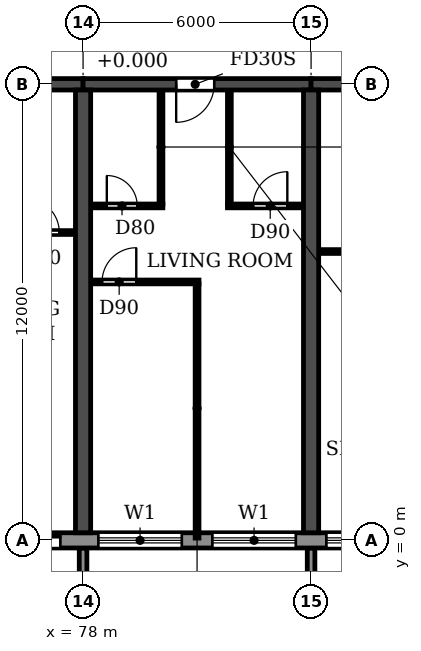
"""IFC4 building model, lengths in metres.
Left out: names, types, materials, properties, quantities, classifications, styles, units other than length and angle.
Written with IfcOpenShell. Run it as: python <this file> out.ifc"""

import sys

from ifc_helpers import new_model, si_unit, direction, frame, frame_2d, origin, place, context, subcontext, project, spatial, polyline, rectangle, outline, extrude, source, transform, mapped, element, fill, save


model = new_model("IFC4")
c1 = context("Model", 3, precision=1e-05, world=origin(), true_north=direction((0.0, 1.0)))
c2 = subcontext(c1, "Body", "Model", "MODEL_VIEW")
j1 = project(units=[si_unit("LENGTHUNIT", "METRE"), si_unit("PLANEANGLEUNIT", "RADIAN")], contexts=[c1])
p1 = place(None, origin())
s1 = spatial("IfcSite", under=j1, at=p1, CompositionType="ELEMENT")
p2 = place(p1, origin())
s2 = spatial("IfcBuilding", under=s1, at=p2, CompositionType="ELEMENT")
p3 = place(p2, frame((0.0, 0.0, 49.8)))
s3 = spatial("IfcBuildingStorey", under=s2, at=p3, CompositionType="ELEMENT", Elevation=49.8)
for number, where, z_axis, x_axis in (
    (1, (78.0, 0.2, 0.0), (0.0, 0.0, 1.0), (0.0, 1.0, 0.0)),
    (2, (84.0, 0.2, 0.0), (0.0, 0.0, 1.0), (0.0, 1.0, 0.0)),
):
    element("IfcWall", number, at=place(p3, frame(where, z_axis=z_axis, x_axis=x_axis)), inside=s3, PredefinedType="SHEAR", context=c2, shape_type="SweptSolid", body=[
        extrude(rectangle(XDim=11.65, YDim=0.4, at=frame_2d((5.825, 0.0))), origin(), (0.0, 0.0, 1.0), 3.0),
    ])
p4 = place(p3, frame((72.0, 12.0, 0.0), z_axis=(0.0, 0.0, 1.0), x_axis=(1.0, 0.0, 0.0)))
e3 = element("IfcWall", 3, at=p4, inside=s3, PredefinedType="SHEAR", context=c2, shape_type="SweptSolid", body=[
    extrude(rectangle(XDim=6.0, YDim=0.3, at=frame_2d((3.0, 0.0))), origin(), (0.0, 0.0, 1.0), 2.4),
])
p5 = place(p4, frame((2.45, 0.0, 0.0)))
e4 = element("IfcOpeningElement", 4, at=p5, cuts=e3, PredefinedType="OPENING", context=c2, shape_type="SweptSolid", body=[
    extrude(rectangle(XDim=1.0, YDim=2.1, at=frame_2d((0.5, 1.05))), frame((0.0, 0.16, 0.0), z_axis=(0.0, -1.0, 0.0), x_axis=(1.0, 0.0, 0.0)), (0.0, 0.0, 1.0), 0.32),
])
p6 = place(p3, frame((78.0, 12.0, 0.0), z_axis=(0.0, 0.0, 1.0), x_axis=(1.0, 0.0, 0.0)))
e5 = element("IfcWall", 5, at=p6, inside=s3, PredefinedType="SHEAR", context=c2, shape_type="SweptSolid", body=[
    extrude(rectangle(XDim=6.0, YDim=0.3, at=frame_2d((3.0, 0.0))), origin(), (0.0, 0.0, 1.0), 2.4),
])
p7 = place(p6, frame((2.45, 0.0, 0.0)))
e6 = element("IfcOpeningElement", 6, at=p7, cuts=e5, PredefinedType="OPENING", context=c2, shape_type="SweptSolid", body=[
    extrude(rectangle(XDim=1.0, YDim=2.1, at=frame_2d((0.5, 1.05))), frame((0.0, 0.16, 0.0), z_axis=(0.0, -1.0, 0.0), x_axis=(1.0, 0.0, 0.0)), (0.0, 0.0, 1.0), 0.32),
])
p8 = place(p3, frame((84.0, 12.0, 0.0), z_axis=(0.0, 0.0, 1.0), x_axis=(1.0, 0.0, 0.0)))
e7 = element("IfcWall", 7, at=p8, inside=s3, PredefinedType="SHEAR", context=c2, shape_type="SweptSolid", body=[
    extrude(rectangle(XDim=6.0, YDim=0.3, at=frame_2d((3.0, 0.0))), origin(), (0.0, 0.0, 1.0), 2.4),
])
p9 = place(p8, frame((2.45, 0.0, 0.0)))
e8 = element("IfcOpeningElement", 8, at=p9, cuts=e7, PredefinedType="OPENING", context=c2, shape_type="SweptSolid", body=[
    extrude(rectangle(XDim=1.0, YDim=2.1, at=frame_2d((0.5, 1.05))), frame((0.0, 0.16, 0.0), z_axis=(0.0, -1.0, 0.0), x_axis=(1.0, 0.0, 0.0)), (0.0, 0.0, 1.0), 0.32),
])
p10 = place(p3, frame((4.683, 0.0, 0.0), z_axis=(0.0, 0.0, 1.0), x_axis=(1.0, 0.0, 0.0)))
e9 = element("IfcWall", 9, at=p10, inside=s3, PredefinedType="STANDARD", context=c2, shape_type="SweptSolid", body=[
    extrude(rectangle(XDim=92.634, YDim=0.4, at=frame_2d((46.317, 0.0))), origin(), (0.0, 0.0, 1.0), 3.0),
])
p11 = place(p10, frame((1.717, 0.0, 0.9)))
e10 = element("IfcOpeningElement", 10, at=p11, cuts=e9, PredefinedType="OPENING", context=c2, shape_type="SweptSolid", body=[
    extrude(rectangle(XDim=2.2, YDim=1.5, at=frame_2d((1.1, 0.75))), frame((0.0, 0.21, 0.0), z_axis=(0.0, -1.0, 0.0), x_axis=(1.0, 0.0, 0.0)), (0.0, 0.0, 1.0), 0.42),
])
p12 = place(p10, frame((4.717, 0.0, 0.9)))
e11 = element("IfcOpeningElement", 11, at=p12, cuts=e9, PredefinedType="OPENING", context=c2, shape_type="SweptSolid", body=[
    extrude(rectangle(XDim=2.2, YDim=1.5, at=frame_2d((1.1, 0.75))), frame((0.0, 0.21, 0.0), z_axis=(0.0, -1.0, 0.0), x_axis=(1.0, 0.0, 0.0)), (0.0, 0.0, 1.0), 0.42),
])
p13 = place(p10, frame((7.717, 0.0, 0.9)))
e12 = element("IfcOpeningElement", 12, at=p13, cuts=e9, PredefinedType="OPENING", context=c2, shape_type="SweptSolid", body=[
    extrude(rectangle(XDim=2.2, YDim=1.5, at=frame_2d((1.1, 0.75))), frame((0.0, 0.21, 0.0), z_axis=(0.0, -1.0, 0.0), x_axis=(1.0, 0.0, 0.0)), (0.0, 0.0, 1.0), 0.42),
])
p14 = place(p10, frame((10.917, 0.0, 0.0)))
e13 = element("IfcOpeningElement", 13, at=p14, cuts=e9, PredefinedType="OPENING", context=c2, shape_type="SweptSolid", body=[
    extrude(rectangle(XDim=1.8, YDim=2.4, at=frame_2d((0.9, 1.2))), frame((0.0, 0.21, 0.0), z_axis=(0.0, -1.0, 0.0), x_axis=(1.0, 0.0, 0.0)), (0.0, 0.0, 1.0), 0.42),
])
p15 = place(p10, frame((13.717, 0.0, 0.9)))
e14 = element("IfcOpeningElement", 14, at=p15, cuts=e9, PredefinedType="OPENING", context=c2, shape_type="SweptSolid", body=[
    extrude(rectangle(XDim=2.2, YDim=1.5, at=frame_2d((1.1, 0.75))), frame((0.0, 0.21, 0.0), z_axis=(0.0, -1.0, 0.0), x_axis=(1.0, 0.0, 0.0)), (0.0, 0.0, 1.0), 0.42),
])
p16 = place(p10, frame((16.717, 0.0, 0.9)))
e15 = element("IfcOpeningElement", 15, at=p16, cuts=e9, PredefinedType="OPENING", context=c2, shape_type="SweptSolid", body=[
    extrude(rectangle(XDim=2.2, YDim=1.5, at=frame_2d((1.1, 0.75))), frame((0.0, 0.21, 0.0), z_axis=(0.0, -1.0, 0.0), x_axis=(1.0, 0.0, 0.0)), (0.0, 0.0, 1.0), 0.42),
])
p17 = place(p10, frame((19.917, 0.0, 0.0)))
e16 = element("IfcOpeningElement", 16, at=p17, cuts=e9, PredefinedType="OPENING", context=c2, shape_type="SweptSolid", body=[
    extrude(rectangle(XDim=1.8, YDim=2.4, at=frame_2d((0.9, 1.2))), frame((0.0, 0.21, 0.0), z_axis=(0.0, -1.0, 0.0), x_axis=(1.0, 0.0, 0.0)), (0.0, 0.0, 1.0), 0.42),
])
p18 = place(p10, frame((22.717, 0.0, 0.9)))
e17 = element("IfcOpeningElement", 17, at=p18, cuts=e9, PredefinedType="OPENING", context=c2, shape_type="SweptSolid", body=[
    extrude(rectangle(XDim=2.2, YDim=1.5, at=frame_2d((1.1, 0.75))), frame((0.0, 0.21, 0.0), z_axis=(0.0, -1.0, 0.0), x_axis=(1.0, 0.0, 0.0)), (0.0, 0.0, 1.0), 0.42),
])
p19 = place(p10, frame((25.717, 0.0, 0.9)))
e18 = element("IfcOpeningElement", 18, at=p19, cuts=e9, PredefinedType="OPENING", context=c2, shape_type="SweptSolid", body=[
    extrude(rectangle(XDim=2.2, YDim=1.5, at=frame_2d((1.1, 0.75))), frame((0.0, 0.21, 0.0), z_axis=(0.0, -1.0, 0.0), x_axis=(1.0, 0.0, 0.0)), (0.0, 0.0, 1.0), 0.42),
])
p20 = place(p10, frame((28.717, 0.0, 0.9)))
e19 = element("IfcOpeningElement", 19, at=p20, cuts=e9, PredefinedType="OPENING", context=c2, shape_type="SweptSolid", body=[
    extrude(rectangle(XDim=2.2, YDim=1.5, at=frame_2d((1.1, 0.75))), frame((0.0, 0.21, 0.0), z_axis=(0.0, -1.0, 0.0), x_axis=(1.0, 0.0, 0.0)), (0.0, 0.0, 1.0), 0.42),
])
p21 = place(p10, frame((31.717, 0.0, 0.9)))
e20 = element("IfcOpeningElement", 20, at=p21, cuts=e9, PredefinedType="OPENING", context=c2, shape_type="SweptSolid", body=[
    extrude(rectangle(XDim=2.2, YDim=1.5, at=frame_2d((1.1, 0.75))), frame((0.0, 0.21, 0.0), z_axis=(0.0, -1.0, 0.0), x_axis=(1.0, 0.0, 0.0)), (0.0, 0.0, 1.0), 0.42),
])
p22 = place(p10, frame((34.917, 0.0, 0.0)))
e21 = element("IfcOpeningElement", 21, at=p22, cuts=e9, PredefinedType="OPENING", context=c2, shape_type="SweptSolid", body=[
    extrude(rectangle(XDim=1.8, YDim=2.4, at=frame_2d((0.9, 1.2))), frame((0.0, 0.21, 0.0), z_axis=(0.0, -1.0, 0.0), x_axis=(1.0, 0.0, 0.0)), (0.0, 0.0, 1.0), 0.42),
])
p23 = place(p10, frame((37.717, 0.0, 0.9)))
e22 = element("IfcOpeningElement", 22, at=p23, cuts=e9, PredefinedType="OPENING", context=c2, shape_type="SweptSolid", body=[
    extrude(rectangle(XDim=2.2, YDim=1.5, at=frame_2d((1.1, 0.75))), frame((0.0, 0.21, 0.0), z_axis=(0.0, -1.0, 0.0), x_axis=(1.0, 0.0, 0.0)), (0.0, 0.0, 1.0), 0.42),
])
p24 = place(p10, frame((40.717, 0.0, 0.9)))
e23 = element("IfcOpeningElement", 23, at=p24, cuts=e9, PredefinedType="OPENING", context=c2, shape_type="SweptSolid", body=[
    extrude(rectangle(XDim=2.2, YDim=1.5, at=frame_2d((1.1, 0.75))), frame((0.0, 0.21, 0.0), z_axis=(0.0, -1.0, 0.0), x_axis=(1.0, 0.0, 0.0)), (0.0, 0.0, 1.0), 0.42),
])
p25 = place(p10, frame((43.717, 0.0, 0.9)))
e24 = element("IfcOpeningElement", 24, at=p25, cuts=e9, PredefinedType="OPENING", context=c2, shape_type="SweptSolid", body=[
    extrude(rectangle(XDim=2.2, YDim=1.5, at=frame_2d((1.1, 0.75))), frame((0.0, 0.21, 0.0), z_axis=(0.0, -1.0, 0.0), x_axis=(1.0, 0.0, 0.0)), (0.0, 0.0, 1.0), 0.42),
])
p26 = place(p10, frame((46.917, 0.0, 0.0)))
e25 = element("IfcOpeningElement", 25, at=p26, cuts=e9, PredefinedType="OPENING", context=c2, shape_type="SweptSolid", body=[
    extrude(rectangle(XDim=1.8, YDim=2.4, at=frame_2d((0.9, 1.2))), frame((0.0, 0.21, 0.0), z_axis=(0.0, -1.0, 0.0), x_axis=(1.0, 0.0, 0.0)), (0.0, 0.0, 1.0), 0.42),
])
p27 = place(p10, frame((49.717, 0.0, 0.9)))
e26 = element("IfcOpeningElement", 26, at=p27, cuts=e9, PredefinedType="OPENING", context=c2, shape_type="SweptSolid", body=[
    extrude(rectangle(XDim=2.2, YDim=1.5, at=frame_2d((1.1, 0.75))), frame((0.0, 0.21, 0.0), z_axis=(0.0, -1.0, 0.0), x_axis=(1.0, 0.0, 0.0)), (0.0, 0.0, 1.0), 0.42),
])
p28 = place(p10, frame((52.717, 0.0, 0.9)))
e27 = element("IfcOpeningElement", 27, at=p28, cuts=e9, PredefinedType="OPENING", context=c2, shape_type="SweptSolid", body=[
    extrude(rectangle(XDim=2.2, YDim=1.5, at=frame_2d((1.1, 0.75))), frame((0.0, 0.21, 0.0), z_axis=(0.0, -1.0, 0.0), x_axis=(1.0, 0.0, 0.0)), (0.0, 0.0, 1.0), 0.42),
])
p29 = place(p10, frame((55.717, 0.0, 0.9)))
e28 = element("IfcOpeningElement", 28, at=p29, cuts=e9, PredefinedType="OPENING", context=c2, shape_type="SweptSolid", body=[
    extrude(rectangle(XDim=2.2, YDim=1.5, at=frame_2d((1.1, 0.75))), frame((0.0, 0.21, 0.0), z_axis=(0.0, -1.0, 0.0), x_axis=(1.0, 0.0, 0.0)), (0.0, 0.0, 1.0), 0.42),
])
p30 = place(p10, frame((58.917, 0.0, 0.0)))
e29 = element("IfcOpeningElement", 29, at=p30, cuts=e9, PredefinedType="OPENING", context=c2, shape_type="SweptSolid", body=[
    extrude(rectangle(XDim=1.8, YDim=2.4, at=frame_2d((0.9, 1.2))), frame((0.0, 0.21, 0.0), z_axis=(0.0, -1.0, 0.0), x_axis=(1.0, 0.0, 0.0)), (0.0, 0.0, 1.0), 0.42),
])
p31 = place(p10, frame((61.717, 0.0, 0.9)))
e30 = element("IfcOpeningElement", 30, at=p31, cuts=e9, PredefinedType="OPENING", context=c2, shape_type="SweptSolid", body=[
    extrude(rectangle(XDim=2.2, YDim=1.5, at=frame_2d((1.1, 0.75))), frame((0.0, 0.21, 0.0), z_axis=(0.0, -1.0, 0.0), x_axis=(1.0, 0.0, 0.0)), (0.0, 0.0, 1.0), 0.42),
])
p32 = place(p10, frame((64.717, 0.0, 0.9)))
e31 = element("IfcOpeningElement", 31, at=p32, cuts=e9, PredefinedType="OPENING", context=c2, shape_type="SweptSolid", body=[
    extrude(rectangle(XDim=2.2, YDim=1.5, at=frame_2d((1.1, 0.75))), frame((0.0, 0.21, 0.0), z_axis=(0.0, -1.0, 0.0), x_axis=(1.0, 0.0, 0.0)), (0.0, 0.0, 1.0), 0.42),
])
p33 = place(p10, frame((67.717, 0.0, 0.9)))
e32 = element("IfcOpeningElement", 32, at=p33, cuts=e9, PredefinedType="OPENING", context=c2, shape_type="SweptSolid", body=[
    extrude(rectangle(XDim=2.2, YDim=1.5, at=frame_2d((1.1, 0.75))), frame((0.0, 0.21, 0.0), z_axis=(0.0, -1.0, 0.0), x_axis=(1.0, 0.0, 0.0)), (0.0, 0.0, 1.0), 0.42),
])
p34 = place(p10, frame((70.917, 0.0, 0.0)))
e33 = element("IfcOpeningElement", 33, at=p34, cuts=e9, PredefinedType="OPENING", context=c2, shape_type="SweptSolid", body=[
    extrude(rectangle(XDim=1.8, YDim=2.4, at=frame_2d((0.9, 1.2))), frame((0.0, 0.21, 0.0), z_axis=(0.0, -1.0, 0.0), x_axis=(1.0, 0.0, 0.0)), (0.0, 0.0, 1.0), 0.42),
])
p35 = place(p10, frame((73.717, 0.0, 0.9)))
e34 = element("IfcOpeningElement", 34, at=p35, cuts=e9, PredefinedType="OPENING", context=c2, shape_type="SweptSolid", body=[
    extrude(rectangle(XDim=2.2, YDim=1.5, at=frame_2d((1.1, 0.75))), frame((0.0, 0.21, 0.0), z_axis=(0.0, -1.0, 0.0), x_axis=(1.0, 0.0, 0.0)), (0.0, 0.0, 1.0), 0.42),
])
p36 = place(p10, frame((76.717, 0.0, 0.9)))
e35 = element("IfcOpeningElement", 35, at=p36, cuts=e9, PredefinedType="OPENING", context=c2, shape_type="SweptSolid", body=[
    extrude(rectangle(XDim=2.2, YDim=1.5, at=frame_2d((1.1, 0.75))), frame((0.0, 0.21, 0.0), z_axis=(0.0, -1.0, 0.0), x_axis=(1.0, 0.0, 0.0)), (0.0, 0.0, 1.0), 0.42),
])
p37 = place(p10, frame((79.717, 0.0, 0.9)))
e36 = element("IfcOpeningElement", 36, at=p37, cuts=e9, PredefinedType="OPENING", context=c2, shape_type="SweptSolid", body=[
    extrude(rectangle(XDim=2.2, YDim=1.5, at=frame_2d((1.1, 0.75))), frame((0.0, 0.21, 0.0), z_axis=(0.0, -1.0, 0.0), x_axis=(1.0, 0.0, 0.0)), (0.0, 0.0, 1.0), 0.42),
])
p38 = place(p10, frame((82.917, 0.0, 0.0)))
e37 = element("IfcOpeningElement", 37, at=p38, cuts=e9, PredefinedType="OPENING", context=c2, shape_type="SweptSolid", body=[
    extrude(rectangle(XDim=1.8, YDim=2.4, at=frame_2d((0.9, 1.2))), frame((0.0, 0.21, 0.0), z_axis=(0.0, -1.0, 0.0), x_axis=(1.0, 0.0, 0.0)), (0.0, 0.0, 1.0), 0.42),
])
p39 = place(p10, frame((85.717, 0.0, 0.9)))
e38 = element("IfcOpeningElement", 38, at=p39, cuts=e9, PredefinedType="OPENING", context=c2, shape_type="SweptSolid", body=[
    extrude(rectangle(XDim=2.2, YDim=1.5, at=frame_2d((1.1, 0.75))), frame((0.0, 0.21, 0.0), z_axis=(0.0, -1.0, 0.0), x_axis=(1.0, 0.0, 0.0)), (0.0, 0.0, 1.0), 0.42),
])
p40 = place(p10, frame((88.717, 0.0, 0.9)))
e39 = element("IfcOpeningElement", 39, at=p40, cuts=e9, PredefinedType="OPENING", context=c2, shape_type="SweptSolid", body=[
    extrude(rectangle(XDim=2.2, YDim=1.5, at=frame_2d((1.1, 0.75))), frame((0.0, 0.21, 0.0), z_axis=(0.0, -1.0, 0.0), x_axis=(1.0, 0.0, 0.0)), (0.0, 0.0, 1.0), 0.42),
])
m1 = source(origin(), c2, "Body", "SweptSolid", [
    extrude(outline(polyline([(0.0, 0.0), (0.2, 0.0), (0.2, 1.65), (0.0, 1.65), (0.0, 0.0)])), origin(), (0.0, 0.0, 1.0), 3.1),
])
for number, where in (
    (40, (77.9, -1.85, 0.0)),
    (41, (83.9, -1.85, 0.0)),
):
    element("IfcWall", number, at=place(p3, frame(where)), inside=s3, PredefinedType="STANDARD", context=c2, shape_type="MappedRepresentation", body=[
        mapped(m1, transform((0.0, 0.0, 0.0))),
    ])
p41 = place(p3, frame((78.21, 6.8, 0.0), z_axis=(0.0, 0.0, 1.0), x_axis=(1.0, 0.0, 0.0)))
e42 = element("IfcWall", 42, at=p41, inside=s3, PredefinedType="PARTITIONING", context=c2, shape_type="SweptSolid", body=[
    extrude(rectangle(XDim=2.84, YDim=0.1, at=frame_2d((1.42, 0.0))), origin(), (0.0, 0.0, 1.0), 3.0),
])
p42 = place(p41, frame((0.29, 0.0, 0.0)))
e43 = element("IfcOpeningElement", 43, at=p42, cuts=e42, PredefinedType="OPENING", context=c2, shape_type="SweptSolid", body=[
    extrude(rectangle(XDim=0.9, YDim=2.1, at=frame_2d((0.45, 1.05))), frame((0.0, 0.06, 0.0), z_axis=(0.0, -1.0, 0.0), x_axis=(1.0, 0.0, 0.0)), (0.0, 0.0, 1.0), 0.12),
])
p43 = place(p3, frame((84.21, 7.6, 0.0), z_axis=(0.0, 0.0, 1.0), x_axis=(1.0, 0.0, 0.0)))
e44 = element("IfcWall", 44, at=p43, inside=s3, PredefinedType="PARTITIONING", context=c2, shape_type="SweptSolid", body=[
    extrude(rectangle(XDim=1.89, YDim=0.1, at=frame_2d((0.945, 0.0))), origin(), (0.0, 0.0, 1.0), 3.0),
])
p44 = place(p3, frame((75.8, 8.1, 0.0), z_axis=(0.0, 0.0, 1.0), x_axis=(1.0, 0.0, 0.0)))
e45 = element("IfcWall", 45, at=p44, inside=s3, PredefinedType="PARTITIONING", context=c2, shape_type="SweptSolid", body=[
    extrude(rectangle(XDim=1.99, YDim=0.1, at=frame_2d((0.995, 0.0))), origin(), (0.0, 0.0, 1.0), 3.0),
])
p45 = place(p44, frame((0.675, 0.0, 0.0)))
e46 = element("IfcOpeningElement", 46, at=p45, cuts=e45, PredefinedType="OPENING", context=c2, shape_type="SweptSolid", body=[
    extrude(rectangle(XDim=0.9, YDim=2.1, at=frame_2d((0.45, 1.05))), frame((0.0, 0.06, 0.0), z_axis=(0.0, -1.0, 0.0), x_axis=(1.0, 0.0, 0.0)), (0.0, 0.0, 1.0), 0.12),
])
p46 = place(p3, frame((78.21, 8.8, 0.0), z_axis=(0.0, 0.0, 1.0), x_axis=(1.0, 0.0, 0.0)))
e47 = element("IfcWall", 47, at=p46, inside=s3, PredefinedType="PARTITIONING", context=c2, shape_type="SweptSolid", body=[
    extrude(rectangle(XDim=1.89, YDim=0.1, at=frame_2d((0.945, 0.0))), origin(), (0.0, 0.0, 1.0), 3.0),
])
p47 = place(p46, frame((0.415, 0.0, 0.0)))
e48 = element("IfcOpeningElement", 48, at=p47, cuts=e47, PredefinedType="OPENING", context=c2, shape_type="SweptSolid", body=[
    extrude(rectangle(XDim=0.8, YDim=2.1, at=frame_2d((0.4, 1.05))), frame((0.0, 0.06, 0.0), z_axis=(0.0, -1.0, 0.0), x_axis=(1.0, 0.0, 0.0)), (0.0, 0.0, 1.0), 0.12),
])
p48 = place(p3, frame((81.8, 8.8, 0.0), z_axis=(0.0, 0.0, 1.0), x_axis=(1.0, 0.0, 0.0)))
e49 = element("IfcWall", 49, at=p48, inside=s3, PredefinedType="PARTITIONING", context=c2, shape_type="SweptSolid", body=[
    extrude(rectangle(XDim=1.99, YDim=0.1, at=frame_2d((0.995, 0.0))), origin(), (0.0, 0.0, 1.0), 3.0),
])
p49 = place(p48, frame((0.675, 0.0, 0.0)))
e50 = element("IfcOpeningElement", 50, at=p49, cuts=e49, PredefinedType="OPENING", context=c2, shape_type="SweptSolid", body=[
    extrude(rectangle(XDim=0.9, YDim=2.1, at=frame_2d((0.45, 1.05))), frame((0.0, 0.06, 0.0), z_axis=(0.0, -1.0, 0.0), x_axis=(1.0, 0.0, 0.0)), (0.0, 0.0, 1.0), 0.12),
])
p50 = place(p3, frame((80.05, 8.85, 0.0), z_axis=(0.0, 0.0, 1.0), x_axis=(0.0, 1.0, 0.0)))
e51 = element("IfcWall", 51, at=p50, inside=s3, PredefinedType="PARTITIONING", context=c2, shape_type="SweptSolid", body=[
    extrude(rectangle(XDim=2.99, YDim=0.1, at=frame_2d((1.495, 0.0))), origin(), (0.0, 0.0, 1.0), 3.0),
])
p51 = place(p3, frame((81.0, 0.06, 0.0), z_axis=(0.0, 0.0, 1.0), x_axis=(0.0, 1.0, 0.0)))
e52 = element("IfcWall", 52, at=p51, inside=s3, PredefinedType="PARTITIONING", context=c2, shape_type="SweptSolid", body=[
    extrude(rectangle(XDim=6.69, YDim=0.1, at=frame_2d((3.345, 0.0))), origin(), (0.0, 0.0, 1.0), 3.0),
])
p52 = place(p3, frame((81.85, 8.85, 0.0), z_axis=(0.0, 0.0, 1.0), x_axis=(0.0, 1.0, 0.0)))
e53 = element("IfcWall", 53, at=p52, inside=s3, PredefinedType="PARTITIONING", context=c2, shape_type="SweptSolid", body=[
    extrude(rectangle(XDim=2.99, YDim=0.1, at=frame_2d((1.495, 0.0))), origin(), (0.0, 0.0, 1.0), 3.0),
])
p53 = place(p34, origin())
e54 = element("IfcDoor", 54, at=p53, inside=s3, OperationType="DOUBLE_DOOR_SLIDING", PredefinedType="DOOR", context=c2, shape_type="SweptSolid", body=[
    extrude(rectangle(XDim=1.8, YDim=2.4, at=frame_2d((0.9, 1.2))), frame((0.0, 0.025, 0.0), z_axis=(0.0, -1.0, 0.0), x_axis=(1.0, 0.0, 0.0)), (0.0, 0.0, 1.0), 0.05),
])
fill(e33, e54)
p54 = place(p35, origin())
e55 = element("IfcWindow", 55, at=p54, inside=s3, PartitioningType="DOUBLE_PANEL_HORIZONTAL", PredefinedType="WINDOW", context=c2, shape_type="SweptSolid", body=[
    extrude(rectangle(XDim=2.2, YDim=1.5, at=frame_2d((1.1, 0.75))), frame((0.0, 0.03, 0.0), z_axis=(0.0, -1.0, 0.0), x_axis=(1.0, 0.0, 0.0)), (0.0, 0.0, 1.0), 0.06),
])
fill(e34, e55)
p55 = place(p36, origin())
e56 = element("IfcWindow", 56, at=p55, inside=s3, PartitioningType="DOUBLE_PANEL_HORIZONTAL", PredefinedType="WINDOW", context=c2, shape_type="SweptSolid", body=[
    extrude(rectangle(XDim=2.2, YDim=1.5, at=frame_2d((1.1, 0.75))), frame((0.0, 0.03, 0.0), z_axis=(0.0, -1.0, 0.0), x_axis=(1.0, 0.0, 0.0)), (0.0, 0.0, 1.0), 0.06),
])
fill(e35, e56)
p56 = place(p37, origin())
e57 = element("IfcWindow", 57, at=p56, inside=s3, PartitioningType="DOUBLE_PANEL_HORIZONTAL", PredefinedType="WINDOW", context=c2, shape_type="SweptSolid", body=[
    extrude(rectangle(XDim=2.2, YDim=1.5, at=frame_2d((1.1, 0.75))), frame((0.0, 0.03, 0.0), z_axis=(0.0, -1.0, 0.0), x_axis=(1.0, 0.0, 0.0)), (0.0, 0.0, 1.0), 0.06),
])
fill(e36, e57)
p57 = place(p45, origin())
e58 = element("IfcDoor", 58, at=p57, inside=s3, OperationType="SINGLE_SWING_LEFT", PredefinedType="DOOR", context=c2, shape_type="SweptSolid", body=[
    extrude(rectangle(XDim=0.9, YDim=2.1, at=frame_2d((0.45, 1.05))), frame((0.0, 0.025, 0.0), z_axis=(0.0, -1.0, 0.0), x_axis=(1.0, 0.0, 0.0)), (0.0, 0.0, 1.0), 0.05),
])
fill(e46, e58)
p58 = place(p42, origin())
e59 = element("IfcDoor", 59, at=p58, inside=s3, OperationType="SINGLE_SWING_RIGHT", PredefinedType="DOOR", context=c2, shape_type="SweptSolid", body=[
    extrude(rectangle(XDim=0.9, YDim=2.1, at=frame_2d((0.45, 1.05))), frame((0.0, 0.025, 0.0), z_axis=(0.0, -1.0, 0.0), x_axis=(1.0, 0.0, 0.0)), (0.0, 0.0, 1.0), 0.05),
])
fill(e43, e59)
p59 = place(p47, origin())
e60 = element("IfcDoor", 60, at=p59, inside=s3, OperationType="SINGLE_SWING_LEFT", PredefinedType="DOOR", context=c2, shape_type="SweptSolid", body=[
    extrude(rectangle(XDim=0.8, YDim=2.1, at=frame_2d((0.4, 1.05))), frame((0.0, 0.025, 0.0), z_axis=(0.0, -1.0, 0.0), x_axis=(1.0, 0.0, 0.0)), (0.0, 0.0, 1.0), 0.05),
])
fill(e48, e60)
p60 = place(p7, frame((1.0, 0.0, 0.0), z_axis=(0.0, 0.0, 1.0), x_axis=(-1.0, 0.0, 0.0)))
e61 = element("IfcDoor", 61, at=p60, inside=s3, OperationType="SINGLE_SWING_RIGHT", PredefinedType="DOOR", context=c2, shape_type="SweptSolid", body=[
    extrude(rectangle(XDim=1.0, YDim=2.1, at=frame_2d((0.5, 1.05))), frame((0.0, 0.025, 0.0), z_axis=(0.0, -1.0, 0.0), x_axis=(1.0, 0.0, 0.0)), (0.0, 0.0, 1.0), 0.05),
])
fill(e6, e61)
p61 = place(p49, origin())
e62 = element("IfcDoor", 62, at=p61, inside=s3, OperationType="SINGLE_SWING_RIGHT", PredefinedType="DOOR", context=c2, shape_type="SweptSolid", body=[
    extrude(rectangle(XDim=0.9, YDim=2.1, at=frame_2d((0.45, 1.05))), frame((0.0, 0.025, 0.0), z_axis=(0.0, -1.0, 0.0), x_axis=(1.0, 0.0, 0.0)), (0.0, 0.0, 1.0), 0.05),
])
fill(e50, e62)
save(model, sys.argv[1])
